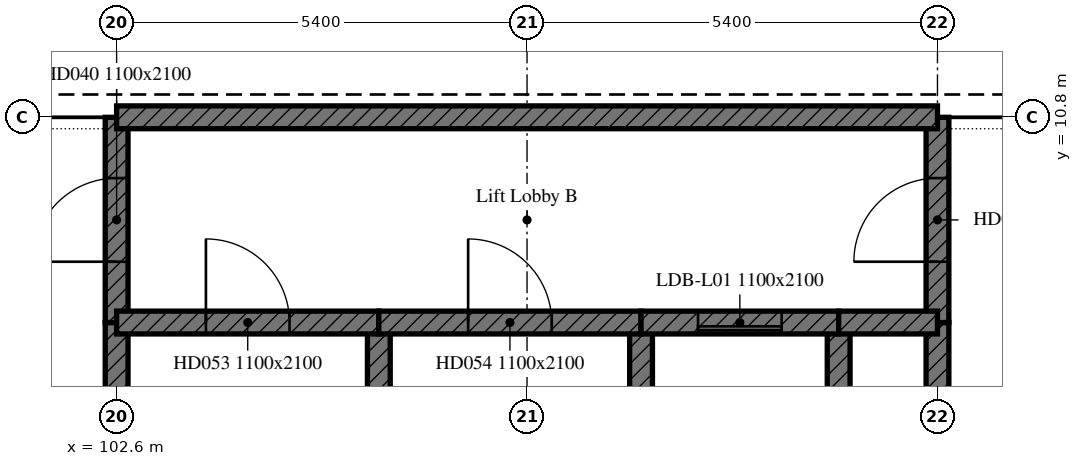
"""IFC4 building model, lengths in metres.
Left out: names, types, materials, properties, quantities, classifications, styles, units other than length and angle.
Written with IfcOpenShell. Run it as: python <this file> out.ifc"""

import sys

from ifc_helpers import new_model, si_unit, direction, frame, frame_2d, origin, place, context, subcontext, project, spatial, rectangle, extrude, element, fill, save


model = new_model("IFC4")
c1 = context("Model", 3, precision=1e-05, world=origin(), true_north=direction((0.0, 1.0)))
c2 = subcontext(c1, "Body", "Model", "MODEL_VIEW")
j1 = project(units=[si_unit("LENGTHUNIT", "METRE"), si_unit("PLANEANGLEUNIT", "RADIAN")], contexts=[c1])
p1 = place(None, origin())
s1 = spatial("IfcSite", under=j1, at=p1, CompositionType="ELEMENT")
p2 = place(p1, origin())
s2 = spatial("IfcBuilding", under=s1, at=p2, CompositionType="ELEMENT")
p3 = place(p2, frame((0.0, 0.0, 8.4)))
s3 = spatial("IfcBuildingStorey", under=s2, at=p3, CompositionType="ELEMENT", Elevation=8.4)
p4 = place(p3, frame((102.6, 5.4, 0.0), z_axis=(0.0, 0.0, 1.0), x_axis=(0.0, 1.0, 0.0)))
e1 = element("IfcWall", 1, at=p4, inside=s3, PredefinedType="SHEAR", context=c2, shape_type="SweptSolid", body=[
    extrude(rectangle(XDim=2.7, YDim=0.3, at=frame_2d((1.35, 0.0))), origin(), (0.0, 0.0, 1.0), 5.7),
])
p5 = place(p3, frame((102.6, 8.1, 0.0), z_axis=(0.0, 0.0, 1.0), x_axis=(0.0, 1.0, 0.0)))
e2 = element("IfcWall", 2, at=p5, inside=s3, PredefinedType="SHEAR", context=c2, shape_type="SweptSolid", body=[
    extrude(rectangle(XDim=2.7, YDim=0.3, at=frame_2d((1.35, 0.0))), origin(), (0.0, 0.0, 1.0), 5.7),
])
p6 = place(p5, frame((0.8, 0.0, 0.0)))
e3 = element("IfcOpeningElement", 3, at=p6, cuts=e2, PredefinedType="OPENING", context=c2, shape_type="SweptSolid", body=[
    extrude(rectangle(XDim=1.1, YDim=2.1, at=frame_2d((0.55, 1.05))), frame((0.0, 0.15, 0.0), z_axis=(0.0, -1.0, 0.0), x_axis=(1.0, 0.0, 0.0)), (0.0, 0.0, 1.0), 0.3),
])
p7 = place(p3, frame((113.4, 5.4, 0.0), z_axis=(0.0, 0.0, 1.0), x_axis=(0.0, 1.0, 0.0)))
e4 = element("IfcWall", 4, at=p7, inside=s3, PredefinedType="SHEAR", context=c2, shape_type="SweptSolid", body=[
    extrude(rectangle(XDim=2.7, YDim=0.3, at=frame_2d((1.35, 0.0))), origin(), (0.0, 0.0, 1.0), 5.7),
])
p8 = place(p3, frame((113.4, 8.1, 0.0), z_axis=(0.0, 0.0, 1.0), x_axis=(0.0, 1.0, 0.0)))
e5 = element("IfcWall", 5, at=p8, inside=s3, PredefinedType="SHEAR", context=c2, shape_type="SweptSolid", body=[
    extrude(rectangle(XDim=2.7, YDim=0.3, at=frame_2d((1.35, 0.0))), origin(), (0.0, 0.0, 1.0), 5.7),
])
p9 = place(p8, frame((0.8, 0.0, 0.0)))
e6 = element("IfcOpeningElement", 6, at=p9, cuts=e5, PredefinedType="OPENING", context=c2, shape_type="SweptSolid", body=[
    extrude(rectangle(XDim=1.1, YDim=2.1, at=frame_2d((0.55, 1.05))), frame((0.0, 0.15, 0.0), z_axis=(0.0, -1.0, 0.0), x_axis=(1.0, 0.0, 0.0)), (0.0, 0.0, 1.0), 0.3),
])
p10 = place(p3, frame((106.05, 0.75, 0.0), z_axis=(0.0, 0.0, 1.0), x_axis=(0.0, 1.0, 0.0)))
e7 = element("IfcWall", 7, at=p10, inside=s3, PredefinedType="SHEAR", context=c2, shape_type="SweptSolid", body=[
    extrude(rectangle(XDim=7.35, YDim=0.3, at=frame_2d((3.675, 0.0))), origin(), (0.0, 0.0, 1.0), 5.7),
])
p11 = place(p3, frame((102.6, 8.1, 0.0), z_axis=(0.0, 0.0, 1.0), x_axis=(1.0, 0.0, 0.0)))
e8 = element("IfcWall", 8, at=p11, inside=s3, PredefinedType="SHEAR", context=c2, shape_type="SweptSolid", body=[
    extrude(rectangle(XDim=3.45, YDim=0.3, at=frame_2d((1.725, 0.0))), origin(), (0.0, 0.0, 1.0), 5.7),
])
p12 = place(p11, frame((1.175, 0.0, 0.0)))
e9 = element("IfcOpeningElement", 9, at=p12, cuts=e8, PredefinedType="OPENING", context=c2, shape_type="SweptSolid", body=[
    extrude(rectangle(XDim=1.1, YDim=2.1, at=frame_2d((0.55, 1.05))), frame((0.0, 0.15, 0.0), z_axis=(0.0, -1.0, 0.0), x_axis=(1.0, 0.0, 0.0)), (0.0, 0.0, 1.0), 0.3),
])
p13 = place(p3, frame((109.5, 4.6, 0.0), z_axis=(0.0, 0.0, 1.0), x_axis=(0.0, 1.0, 0.0)))
e10 = element("IfcWall", 10, at=p13, inside=s3, PredefinedType="SHEAR", context=c2, shape_type="SweptSolid", body=[
    extrude(rectangle(XDim=3.5, YDim=0.3, at=frame_2d((1.75, 0.0))), origin(), (0.0, 0.0, 1.0), 5.7),
])
p14 = place(p3, frame((106.05, 8.1, 0.0), z_axis=(0.0, 0.0, 1.0), x_axis=(1.0, 0.0, 0.0)))
e11 = element("IfcWall", 11, at=p14, inside=s3, PredefinedType="SHEAR", context=c2, shape_type="SweptSolid", body=[
    extrude(rectangle(XDim=3.45, YDim=0.3, at=frame_2d((1.725, 0.0))), origin(), (0.0, 0.0, 1.0), 5.7),
])
p15 = place(p14, frame((1.175, 0.0, 0.0)))
e12 = element("IfcOpeningElement", 12, at=p15, cuts=e11, PredefinedType="OPENING", context=c2, shape_type="SweptSolid", body=[
    extrude(rectangle(XDim=1.1, YDim=2.1, at=frame_2d((0.55, 1.05))), frame((0.0, 0.15, 0.0), z_axis=(0.0, -1.0, 0.0), x_axis=(1.0, 0.0, 0.0)), (0.0, 0.0, 1.0), 0.3),
])
p16 = place(p3, frame((112.1, 4.6, 0.0), z_axis=(0.0, 0.0, 1.0), x_axis=(0.0, 1.0, 0.0)))
e13 = element("IfcWall", 13, at=p16, inside=s3, PredefinedType="SHEAR", context=c2, shape_type="SweptSolid", body=[
    extrude(rectangle(XDim=3.5, YDim=0.3, at=frame_2d((1.75, 0.0))), origin(), (0.0, 0.0, 1.0), 5.7),
])
p17 = place(p3, frame((109.5, 8.1, 0.0), z_axis=(0.0, 0.0, 1.0), x_axis=(1.0, 0.0, 0.0)))
e14 = element("IfcWall", 14, at=p17, inside=s3, PredefinedType="SHEAR", context=c2, shape_type="SweptSolid", body=[
    extrude(rectangle(XDim=2.6, YDim=0.3, at=frame_2d((1.3, 0.0))), origin(), (0.0, 0.0, 1.0), 5.7),
])
p18 = place(p17, frame((0.75, 0.0, 0.0)))
e15 = element("IfcOpeningElement", 15, at=p18, cuts=e14, PredefinedType="OPENING", context=c2, shape_type="SweptSolid", body=[
    extrude(rectangle(XDim=1.1, YDim=2.1, at=frame_2d((0.55, 1.05))), frame((0.0, 0.15, 0.0), z_axis=(0.0, -1.0, 0.0), x_axis=(1.0, 0.0, 0.0)), (0.0, 0.0, 1.0), 0.3),
])
p19 = place(p3, frame((112.1, 8.1, 0.0), z_axis=(0.0, 0.0, 1.0), x_axis=(1.0, 0.0, 0.0)))
e16 = element("IfcWall", 16, at=p19, inside=s3, PredefinedType="SHEAR", context=c2, shape_type="SweptSolid", body=[
    extrude(rectangle(XDim=1.3, YDim=0.3, at=frame_2d((0.65, 0.0))), origin(), (0.0, 0.0, 1.0), 5.7),
])
p20 = place(p3, frame((102.6, 10.8, 0.0), z_axis=(0.0, 0.0, 1.0), x_axis=(1.0, 0.0, 0.0)))
e17 = element("IfcWall", 17, at=p20, inside=s3, PredefinedType="SHEAR", context=c2, shape_type="SweptSolid", body=[
    extrude(rectangle(XDim=10.8, YDim=0.3, at=frame_2d((5.4, 0.0))), origin(), (0.0, 0.0, 1.0), 5.7),
])
p21 = place(p6, origin())
e18 = element("IfcDoor", 18, at=p21, inside=s3, OperationType="SINGLE_SWING_LEFT", PredefinedType="DOOR", context=c2, shape_type="SweptSolid", body=[
    extrude(rectangle(XDim=1.1, YDim=2.1, at=frame_2d((0.55, 1.05))), frame((0.0, 0.025, 0.0), z_axis=(0.0, -1.0, 0.0), x_axis=(1.0, 0.0, 0.0)), (0.0, 0.0, 1.0), 0.05),
])
fill(e3, e18)
p22 = place(p9, origin())
e19 = element("IfcDoor", 19, at=p22, inside=s3, OperationType="SINGLE_SWING_LEFT", PredefinedType="DOOR", context=c2, shape_type="SweptSolid", body=[
    extrude(rectangle(XDim=1.1, YDim=2.1, at=frame_2d((0.55, 1.05))), frame((0.0, 0.025, 0.0), z_axis=(0.0, -1.0, 0.0), x_axis=(1.0, 0.0, 0.0)), (0.0, 0.0, 1.0), 0.05),
])
fill(e6, e19)
p23 = place(p12, origin())
e20 = element("IfcDoor", 20, at=p23, inside=s3, OperationType="SINGLE_SWING_LEFT", PredefinedType="DOOR", context=c2, shape_type="SweptSolid", body=[
    extrude(rectangle(XDim=1.1, YDim=2.1, at=frame_2d((0.55, 1.05))), frame((0.0, 0.025, 0.0), z_axis=(0.0, -1.0, 0.0), x_axis=(1.0, 0.0, 0.0)), (0.0, 0.0, 1.0), 0.05),
])
fill(e9, e20)
p24 = place(p15, origin())
e21 = element("IfcDoor", 21, at=p24, inside=s3, OperationType="SINGLE_SWING_LEFT", PredefinedType="DOOR", context=c2, shape_type="SweptSolid", body=[
    extrude(rectangle(XDim=1.1, YDim=2.1, at=frame_2d((0.55, 1.05))), frame((0.0, 0.025, 0.0), z_axis=(0.0, -1.0, 0.0), x_axis=(1.0, 0.0, 0.0)), (0.0, 0.0, 1.0), 0.05),
])
fill(e12, e21)
p25 = place(p18, origin())
e22 = element("IfcDoor", 22, at=p25, inside=s3, OperationType="SLIDING_TO_LEFT", PredefinedType="DOOR", context=c2, shape_type="SweptSolid", body=[
    extrude(rectangle(XDim=1.1, YDim=2.1, at=frame_2d((0.55, 1.05))), frame((0.0, 0.025, 0.0), z_axis=(0.0, -1.0, 0.0), x_axis=(1.0, 0.0, 0.0)), (0.0, 0.0, 1.0), 0.05),
])
fill(e15, e22)
save(model, sys.argv[1])
